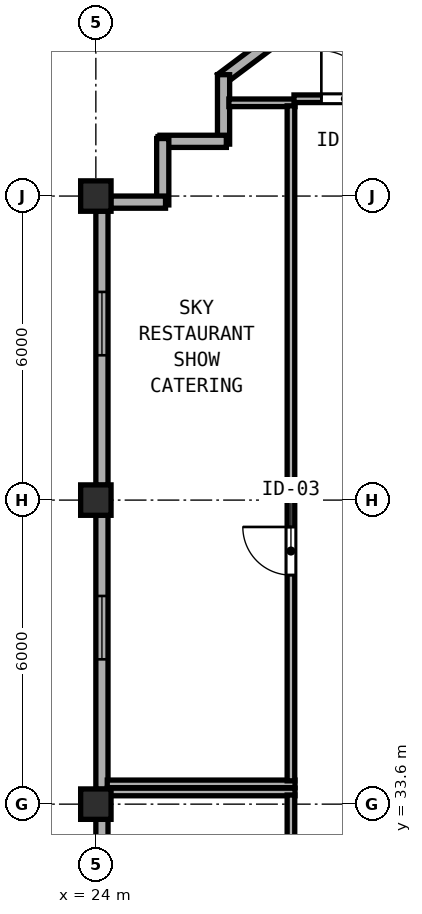
"""IFC4 building model, lengths in metres.
Left out: names, types, materials, properties, quantities, classifications, styles, units other than length and angle.
Written with IfcOpenShell. Run it as: python <this file> out.ifc"""

import sys

from ifc_helpers import new_model, si_unit, direction, frame, frame_2d, origin, origin_2d, place, context, subcontext, project, spatial, rectangle, hollow_rectangle, extrude, element, fill, save


model = new_model("IFC4")
c1 = context("Model", 3, precision=1e-05, world=origin(), true_north=direction((0.0, 1.0)))
c2 = subcontext(c1, "Body", "Model", "MODEL_VIEW")
j1 = project(units=[si_unit("LENGTHUNIT", "METRE"), si_unit("PLANEANGLEUNIT", "RADIAN")], contexts=[c1])
p1 = place(None, origin())
s1 = spatial("IfcSite", under=j1, at=p1, CompositionType="ELEMENT")
p2 = place(p1, origin())
s2 = spatial("IfcBuilding", under=s1, at=p2, CompositionType="ELEMENT")
p3 = place(p2, frame((0.0, 0.0, 313.4)))
s3 = spatial("IfcBuildingStorey", under=s2, at=p3, CompositionType="ELEMENT", Elevation=313.4)
for number, where, z_axis, x_axis in (
    (1, (24.0, 33.6, 0.0), (0.0, 0.0, 1.0), (1.0, 0.0, 0.0)),
    (2, (24.0, 45.6, 0.0), (0.0, 0.0, 1.0), (1.0, 0.0, 0.0)),
    (3, (24.0, 39.6, 0.0), (0.0, 0.0, 1.0), (1.0, 0.0, 0.0)),
):
    element("IfcColumn", number, at=place(p3, frame(where, z_axis=z_axis, x_axis=x_axis)), inside=s3, PredefinedType="COLUMN", context=c2, shape_type="SweptSolid", body=[
        extrude(hollow_rectangle(XDim=0.6, YDim=0.6, WallThickness=0.024, at=origin_2d()), origin(), (0.0, 0.0, 1.0), 4.8),
    ])
p4 = place(p3, frame((31.292, 51.519, 0.0), z_axis=(0.0, 0.0, 1.0), x_axis=(-0.8, -0.6, 0.0)))
e4 = element("IfcWall", 4, at=p4, inside=s3, PredefinedType="SOLIDWALL", context=c2, shape_type="SweptSolid", body=[
    extrude(rectangle(XDim=6.021, YDim=0.24, at=frame_2d((3.01, 0.0))), origin(), (0.0, 0.0, 1.0), 4.56),
])
p5 = place(p4, frame((1.6, 0.0, 0.85)))
e5 = element("IfcOpeningElement", 5, at=p5, cuts=e4, PredefinedType="OPENING", context=c2, shape_type="SweptSolid", body=[
    extrude(rectangle(XDim=1.25, YDim=1.95, at=frame_2d((0.625, 0.975))), frame((0.0, 0.13, 0.0), z_axis=(0.0, -1.0, 0.0), x_axis=(1.0, 0.0, 0.0)), (0.0, 0.0, 1.0), 0.26),
])
p6 = place(p3, frame((26.52, 47.995, 0.0), z_axis=(0.0, 0.0, 1.0), x_axis=(0.0, -1.0, 0.0)))
e6 = element("IfcWall", 6, at=p6, inside=s3, PredefinedType="SOLIDWALL", context=c2, shape_type="SweptSolid", body=[
    extrude(rectangle(XDim=1.37, YDim=0.24, at=frame_2d((0.685, 0.0))), origin(), (0.0, 0.0, 1.0), 4.56),
])
for number, where, z_axis, x_axis in (
    (7, (26.575, 46.68, 0.0), (0.0, 0.0, 1.0), (-1.0, 0.0, 0.0)),
    (8, (25.32, 46.735, 0.0), (0.0, 0.0, 1.0), (0.0, -1.0, 0.0)),
):
    element("IfcWall", number, at=place(p3, frame(where, z_axis=z_axis, x_axis=x_axis)), inside=s3, PredefinedType="SOLIDWALL", context=c2, shape_type="SweptSolid", body=[
        extrude(rectangle(XDim=1.31, YDim=0.24, at=frame_2d((0.655, 0.0))), origin(), (0.0, 0.0, 1.0), 4.56),
    ])
p7 = place(p3, frame((25.375, 45.48, 0.0), z_axis=(0.0, 0.0, 1.0), x_axis=(-1.0, 0.0, 0.0)))
e9 = element("IfcWall", 9, at=p7, inside=s3, PredefinedType="SOLIDWALL", context=c2, shape_type="SweptSolid", body=[
    extrude(rectangle(XDim=1.083, YDim=0.24, at=frame_2d((0.542, 0.0))), origin(), (0.0, 0.0, 1.0), 4.56),
])
p8 = place(p3, frame((24.12, 45.308, 0.0), z_axis=(0.0, 0.0, 1.0), x_axis=(0.0, -1.0, 0.0)))
e10 = element("IfcWall", 10, at=p8, inside=s3, PredefinedType="SOLIDWALL", context=c2, shape_type="SweptSolid", body=[
    extrude(rectangle(XDim=5.416, YDim=0.24, at=frame_2d((2.708, 0.0))), origin(), (0.0, 0.0, 1.0), 4.155),
])
p9 = place(p8, frame((1.6, 0.0, 0.85)))
e11 = element("IfcOpeningElement", 11, at=p9, cuts=e10, PredefinedType="OPENING", context=c2, shape_type="SweptSolid", body=[
    extrude(rectangle(XDim=1.25, YDim=1.95, at=frame_2d((0.625, 0.975))), frame((0.0, 0.13, 0.0), z_axis=(0.0, -1.0, 0.0), x_axis=(1.0, 0.0, 0.0)), (0.0, 0.0, 1.0), 0.26),
])
p10 = place(p3, frame((24.12, 39.308, 0.0), z_axis=(0.0, 0.0, 1.0), x_axis=(0.0, -1.0, 0.0)))
e12 = element("IfcWall", 12, at=p10, inside=s3, PredefinedType="SOLIDWALL", context=c2, shape_type="SweptSolid", body=[
    extrude(rectangle(XDim=5.416, YDim=0.24, at=frame_2d((2.708, 0.0))), origin(), (0.0, 0.0, 1.0), 4.155),
])
p11 = place(p10, frame((1.6, 0.0, 0.85)))
e13 = element("IfcOpeningElement", 13, at=p11, cuts=e12, PredefinedType="OPENING", context=c2, shape_type="SweptSolid", body=[
    extrude(rectangle(XDim=1.25, YDim=1.95, at=frame_2d((0.625, 0.975))), frame((0.0, 0.13, 0.0), z_axis=(0.0, -1.0, 0.0), x_axis=(1.0, 0.0, 0.0)), (0.0, 0.0, 1.0), 0.26),
])
p12 = place(p3, frame((24.12, 33.308, 0.0), z_axis=(0.0, 0.0, 1.0), x_axis=(0.0, -1.0, 0.0)))
e14 = element("IfcWall", 14, at=p12, inside=s3, PredefinedType="SOLIDWALL", context=c2, shape_type="SweptSolid", body=[
    extrude(rectangle(XDim=5.416, YDim=0.24, at=frame_2d((2.708, 0.0))), origin(), (0.0, 0.0, 1.0), 4.155),
])
p13 = place(p12, frame((1.6, 0.0, 0.85)))
e15 = element("IfcOpeningElement", 15, at=p13, cuts=e14, PredefinedType="OPENING", context=c2, shape_type="SweptSolid", body=[
    extrude(rectangle(XDim=1.25, YDim=1.95, at=frame_2d((0.625, 0.975))), frame((0.0, 0.13, 0.0), z_axis=(0.0, -1.0, 0.0), x_axis=(1.0, 0.0, 0.0)), (0.0, 0.0, 1.0), 0.26),
])
p14 = place(p3, frame((26.625, 47.44, 0.0), z_axis=(0.0, 0.0, 1.0), x_axis=(1.0, 0.0, 0.0)))
e16 = element("IfcWall", 16, at=p14, inside=s3, PredefinedType="PARTITIONING", context=c2, shape_type="SweptSolid", body=[
    extrude(rectangle(XDim=1.305, YDim=0.15, at=frame_2d((0.652, 0.0))), origin(), (0.0, 0.0, 1.0), 4.56),
])
p15 = place(p3, frame((24.225, 34.0, 0.0), z_axis=(0.0, 0.0, 1.0), x_axis=(1.0, 0.0, 0.0)))
e17 = element("IfcWall", 17, at=p15, inside=s3, PredefinedType="PARTITIONING", context=c2, shape_type="SweptSolid", body=[
    extrude(rectangle(XDim=3.705, YDim=0.15, at=frame_2d((1.853, 0.0))), origin(), (0.0, 0.0, 1.0), 4.56),
])
p16 = place(p3, frame((27.85, 34.06, 0.0), z_axis=(0.0, 0.0, 1.0), x_axis=(0.0, 1.0, 0.0)))
e18 = element("IfcWall", 18, at=p16, inside=s3, PredefinedType="PARTITIONING", context=c2, shape_type="SweptSolid", body=[
    extrude(rectangle(XDim=13.32, YDim=0.15, at=frame_2d((6.66, 0.0))), origin(), (0.0, 0.0, 1.0), 4.56),
])
p17 = place(p16, frame((5.01, 0.0, 0.0), z_axis=(0.0, 0.0, 1.0), x_axis=(-1.0, 0.0, 0.0)))
e19 = element("IfcOpeningElement", 19, at=p17, cuts=e18, PredefinedType="OPENING", context=c2, shape_type="SweptSolid", body=[
    extrude(rectangle(XDim=0.95, YDim=2.12, at=frame_2d((0.475, 1.06))), frame((0.0, 0.085, 0.0), z_axis=(0.0, -1.0, 0.0), x_axis=(1.0, 0.0, 0.0)), (0.0, 0.0, 1.0), 0.17),
])
p18 = place(p3, frame((24.225, 33.84, 0.0), z_axis=(0.0, 0.0, 1.0), x_axis=(1.0, 0.0, 0.0)))
e20 = element("IfcWall", 20, at=p18, inside=s3, PredefinedType="PARTITIONING", context=c2, shape_type="SweptSolid", body=[
    extrude(rectangle(XDim=3.705, YDim=0.15, at=frame_2d((1.853, 0.0))), origin(), (0.0, 0.0, 1.0), 4.56),
])
p19 = place(p3, frame((27.85, 27.66, 0.0), z_axis=(0.0, 0.0, 1.0), x_axis=(0.0, 1.0, 0.0)))
e21 = element("IfcWall", 21, at=p19, inside=s3, PredefinedType="PARTITIONING", context=c2, shape_type="SweptSolid", body=[
    extrude(rectangle(XDim=6.12, YDim=0.15, at=frame_2d((3.06, 0.0))), origin(), (0.0, 0.0, 1.0), 4.56),
])
p20 = place(p19, frame((4.01, 0.0, 0.0), z_axis=(0.0, 0.0, 1.0), x_axis=(-1.0, 0.0, 0.0)))
e22 = element("IfcOpeningElement", 22, at=p20, cuts=e21, PredefinedType="OPENING", context=c2, shape_type="SweptSolid", body=[
    extrude(rectangle(XDim=0.95, YDim=2.12, at=frame_2d((0.475, 1.06))), frame((0.0, 0.085, 0.0), z_axis=(0.0, -1.0, 0.0), x_axis=(1.0, 0.0, 0.0)), (0.0, 0.0, 1.0), 0.17),
])
p21 = place(p3, frame((27.91, 47.52, 0.0), z_axis=(0.0, 0.0, 1.0), x_axis=(1.0, 0.0, 0.0)))
e23 = element("IfcWall", 23, at=p21, inside=s3, PredefinedType="PARTITIONING", context=c2, shape_type="SweptSolid", body=[
    extrude(rectangle(XDim=6.058, YDim=0.15, at=frame_2d((3.029, 0.0))), origin(), (0.0, 0.0, 1.0), 4.56),
])
p22 = place(p21, frame((0.54, 0.0, 0.0)))
e24 = element("IfcOpeningElement", 24, at=p22, cuts=e23, PredefinedType="OPENING", context=c2, shape_type="SweptSolid", body=[
    extrude(rectangle(XDim=0.95, YDim=2.12, at=frame_2d((0.475, 1.06))), frame((0.0, 0.085, 0.0), z_axis=(0.0, -1.0, 0.0), x_axis=(1.0, 0.0, 0.0)), (0.0, 0.0, 1.0), 0.17),
])
p23 = place(p9, origin())
e25 = element("IfcWindow", 25, at=p23, inside=s3, PartitioningType="SINGLE_PANEL", PredefinedType="WINDOW", context=c2, shape_type="SweptSolid", body=[
    extrude(rectangle(XDim=1.25, YDim=1.95, at=frame_2d((0.625, 0.975))), frame((0.0, 0.03, 0.0), z_axis=(0.0, -1.0, 0.0), x_axis=(1.0, 0.0, 0.0)), (0.0, 0.0, 1.0), 0.06),
])
fill(e11, e25)
p24 = place(p11, origin())
e26 = element("IfcWindow", 26, at=p24, inside=s3, PartitioningType="SINGLE_PANEL", PredefinedType="WINDOW", context=c2, shape_type="SweptSolid", body=[
    extrude(rectangle(XDim=1.25, YDim=1.95, at=frame_2d((0.625, 0.975))), frame((0.0, 0.03, 0.0), z_axis=(0.0, -1.0, 0.0), x_axis=(1.0, 0.0, 0.0)), (0.0, 0.0, 1.0), 0.06),
])
fill(e13, e26)
p25 = place(p17, origin())
e27 = element("IfcDoor", 27, at=p25, inside=s3, OperationType="SINGLE_SWING_LEFT", PredefinedType="DOOR", context=c2, shape_type="SweptSolid", body=[
    extrude(rectangle(XDim=0.95, YDim=2.12, at=frame_2d((0.475, 1.06))), frame((0.0, 0.025, 0.0), z_axis=(0.0, -1.0, 0.0), x_axis=(1.0, 0.0, 0.0)), (0.0, 0.0, 1.0), 0.05),
])
fill(e19, e27)
p26 = place(p22, origin())
e28 = element("IfcDoor", 28, at=p26, inside=s3, OperationType="SINGLE_SWING_LEFT", PredefinedType="DOOR", context=c2, shape_type="SweptSolid", body=[
    extrude(rectangle(XDim=0.95, YDim=2.12, at=frame_2d((0.475, 1.06))), frame((0.0, 0.025, 0.0), z_axis=(0.0, -1.0, 0.0), x_axis=(1.0, 0.0, 0.0)), (0.0, 0.0, 1.0), 0.05),
])
fill(e24, e28)
save(model, sys.argv[1])
